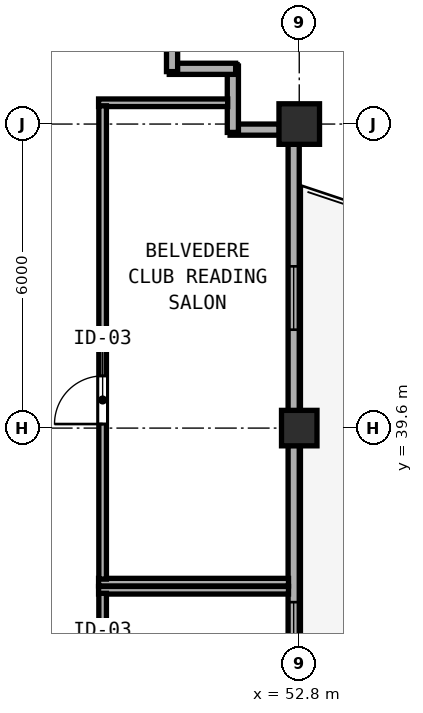
"""IFC4 building model, lengths in metres.
Left out: names, types, materials, properties, quantities, classifications, styles, units other than length and angle.
Written with IfcOpenShell. Run it as: python <this file> out.ifc"""

import sys

from ifc_helpers import new_model, si_unit, direction, frame, frame_2d, origin, origin_2d, place, context, subcontext, project, spatial, rectangle, hollow_rectangle, extrude, element, fill, save


model = new_model("IFC4")
c1 = context("Model", 3, precision=1e-05, world=origin(), true_north=direction((0.0, 1.0)))
c2 = subcontext(c1, "Body", "Model", "MODEL_VIEW")
j1 = project(units=[si_unit("LENGTHUNIT", "METRE"), si_unit("PLANEANGLEUNIT", "RADIAN")], contexts=[c1])
p1 = place(None, origin())
s1 = spatial("IfcSite", under=j1, at=p1, CompositionType="ELEMENT")
p2 = place(p1, origin())
s2 = spatial("IfcBuilding", under=s1, at=p2, CompositionType="ELEMENT")
p3 = place(p2, frame((0.0, 0.0, 235.2)))
s3 = spatial("IfcBuildingStorey", under=s2, at=p3, CompositionType="ELEMENT", Elevation=235.2)
p4 = place(p3, frame((52.8, 45.6, 0.0), z_axis=(0.0, 0.0, 1.0), x_axis=(1.0, 0.0, 0.0)))
e1 = element("IfcColumn", 1, at=p4, inside=s3, PredefinedType="COLUMN", context=c2, shape_type="SweptSolid", body=[
    extrude(hollow_rectangle(XDim=0.8, YDim=0.8, WallThickness=0.03, at=origin_2d()), origin(), (0.0, 0.0, 1.0), 3.85),
])
p5 = place(p3, frame((52.8, 39.6, 0.0), z_axis=(0.0, 0.0, 1.0), x_axis=(1.0, 0.0, 0.0)))
e2 = element("IfcColumn", 2, at=p5, inside=s3, PredefinedType="COLUMN", context=c2, shape_type="SweptSolid", body=[
    extrude(hollow_rectangle(XDim=0.7, YDim=0.7, WallThickness=0.026, at=origin_2d()), origin(), (0.0, 0.0, 1.0), 3.85),
])
p6 = place(p3, frame((52.69, 33.992, 0.0), z_axis=(0.0, 0.0, 1.0), x_axis=(0.0, 1.0, 0.0)))
e3 = element("IfcWall", 3, at=p6, inside=s3, PredefinedType="SOLIDWALL", context=c2, shape_type="SweptSolid", body=[
    extrude(rectangle(XDim=5.266, YDim=0.22, at=frame_2d((2.633, 0.0))), origin(), (0.0, 0.0, 1.0), 3.315),
])
p7 = place(p6, frame((0.923, 0.0, 0.85)))
e4 = element("IfcOpeningElement", 4, at=p7, cuts=e3, PredefinedType="OPENING", context=c2, shape_type="SweptSolid", body=[
    extrude(rectangle(XDim=1.25, YDim=1.95, at=frame_2d((0.625, 0.975))), frame((0.0, 0.12, 0.0), z_axis=(0.0, -1.0, 0.0), x_axis=(1.0, 0.0, 0.0)), (0.0, 0.0, 1.0), 0.24),
])
p8 = place(p3, frame((52.69, 39.942, 0.0), z_axis=(0.0, 0.0, 1.0), x_axis=(0.0, 1.0, 0.0)))
e5 = element("IfcWall", 5, at=p8, inside=s3, PredefinedType="SOLIDWALL", context=c2, shape_type="SweptSolid", body=[
    extrude(rectangle(XDim=5.266, YDim=0.22, at=frame_2d((2.633, 0.0))), origin(), (0.0, 0.0, 1.0), 3.315),
])
p9 = place(p8, frame((1.6, 0.0, 0.85)))
e6 = element("IfcOpeningElement", 6, at=p9, cuts=e5, PredefinedType="OPENING", context=c2, shape_type="SweptSolid", body=[
    extrude(rectangle(XDim=1.25, YDim=1.95, at=frame_2d((0.625, 0.975))), frame((0.0, 0.12, 0.0), z_axis=(0.0, -1.0, 0.0), x_axis=(1.0, 0.0, 0.0)), (0.0, 0.0, 1.0), 0.24),
])
p10 = place(p3, frame((52.408, 45.49, 0.0), z_axis=(0.0, 0.0, 1.0), x_axis=(-1.0, 0.0, 0.0)))
e7 = element("IfcWall", 7, at=p10, inside=s3, PredefinedType="SOLIDWALL", context=c2, shape_type="SweptSolid", body=[
    extrude(rectangle(XDim=0.973, YDim=0.22, at=frame_2d((0.486, 0.0))), origin(), (0.0, 0.0, 1.0), 3.67),
])
p11 = place(p3, frame((51.49, 45.435, 0.0), z_axis=(0.0, 0.0, 1.0), x_axis=(0.0, 1.0, 0.0)))
e8 = element("IfcWall", 8, at=p11, inside=s3, PredefinedType="SOLIDWALL", context=c2, shape_type="SweptSolid", body=[
    extrude(rectangle(XDim=1.31, YDim=0.22, at=frame_2d((0.655, 0.0))), origin(), (0.0, 0.0, 1.0), 3.67),
])
p12 = place(p3, frame((51.545, 46.69, 0.0), z_axis=(0.0, 0.0, 1.0), x_axis=(-1.0, 0.0, 0.0)))
e9 = element("IfcWall", 9, at=p12, inside=s3, PredefinedType="SOLIDWALL", context=c2, shape_type="SweptSolid", body=[
    extrude(rectangle(XDim=1.31, YDim=0.22, at=frame_2d((0.655, 0.0))), origin(), (0.0, 0.0, 1.0), 3.67),
])
p13 = place(p3, frame((50.29, 46.635, 0.0), z_axis=(0.0, 0.0, 1.0), x_axis=(0.0, 1.0, 0.0)))
e10 = element("IfcWall", 10, at=p13, inside=s3, PredefinedType="SOLIDWALL", context=c2, shape_type="SweptSolid", body=[
    extrude(rectangle(XDim=1.535, YDim=0.22, at=frame_2d((0.768, 0.0))), origin(), (0.0, 0.0, 1.0), 3.67),
])
p14 = place(p3, frame((48.84, 36.4, 0.0), z_axis=(0.0, 0.0, 1.0), x_axis=(1.0, 0.0, 0.0)))
e11 = element("IfcWall", 11, at=p14, inside=s3, PredefinedType="PARTITIONING", context=c2, shape_type="SweptSolid", body=[
    extrude(rectangle(XDim=3.748, YDim=0.15, at=frame_2d((1.874, 0.0))), origin(), (0.0, 0.0, 1.0), 3.67),
])
p15 = place(p3, frame((48.92, 33.06, 0.0), z_axis=(0.0, 0.0, 1.0), x_axis=(0.0, 1.0, 0.0)))
e12 = element("IfcWall", 12, at=p15, inside=s3, PredefinedType="PARTITIONING", context=c2, shape_type="SweptSolid", body=[
    extrude(rectangle(XDim=3.28, YDim=0.15, at=frame_2d((1.64, 0.0))), origin(), (0.0, 0.0, 1.0), 3.67),
])
p16 = place(p15, frame((0.86, 0.0, 0.0)))
e13 = element("IfcOpeningElement", 13, at=p16, cuts=e12, PredefinedType="OPENING", context=c2, shape_type="SweptSolid", body=[
    extrude(rectangle(XDim=0.95, YDim=2.12, at=frame_2d((0.475, 1.06))), frame((0.0, 0.085, 0.0), z_axis=(0.0, -1.0, 0.0), x_axis=(1.0, 0.0, 0.0)), (0.0, 0.0, 1.0), 0.17),
])
p17 = place(p3, frame((48.84, 46.02, 0.0), z_axis=(0.0, 0.0, 1.0), x_axis=(1.0, 0.0, 0.0)))
e14 = element("IfcWall", 14, at=p17, inside=s3, PredefinedType="PARTITIONING", context=c2, shape_type="SweptSolid", body=[
    extrude(rectangle(XDim=2.548, YDim=0.15, at=frame_2d((1.274, 0.0))), origin(), (0.0, 0.0, 1.0), 3.67),
])
p18 = place(p3, frame((48.84, 36.56, 0.0), z_axis=(0.0, 0.0, 1.0), x_axis=(1.0, 0.0, 0.0)))
e15 = element("IfcWall", 15, at=p18, inside=s3, PredefinedType="PARTITIONING", context=c2, shape_type="SweptSolid", body=[
    extrude(rectangle(XDim=3.748, YDim=0.15, at=frame_2d((1.874, 0.0))), origin(), (0.0, 0.0, 1.0), 3.67),
])
p19 = place(p3, frame((48.92, 36.62, 0.0), z_axis=(0.0, 0.0, 1.0), x_axis=(0.0, 1.0, 0.0)))
e16 = element("IfcWall", 16, at=p19, inside=s3, PredefinedType="PARTITIONING", context=c2, shape_type="SweptSolid", body=[
    extrude(rectangle(XDim=9.34, YDim=0.15, at=frame_2d((4.67, 0.0))), origin(), (0.0, 0.0, 1.0), 3.67),
])
p20 = place(p19, frame((3.06, 0.0, 0.0)))
e17 = element("IfcOpeningElement", 17, at=p20, cuts=e16, PredefinedType="OPENING", context=c2, shape_type="SweptSolid", body=[
    extrude(rectangle(XDim=0.95, YDim=2.12, at=frame_2d((0.475, 1.06))), frame((0.0, 0.085, 0.0), z_axis=(0.0, -1.0, 0.0), x_axis=(1.0, 0.0, 0.0)), (0.0, 0.0, 1.0), 0.17),
])
p21 = place(p7, origin())
e18 = element("IfcWindow", 18, at=p21, inside=s3, PartitioningType="SINGLE_PANEL", PredefinedType="WINDOW", context=c2, shape_type="SweptSolid", body=[
    extrude(rectangle(XDim=1.25, YDim=1.95, at=frame_2d((0.625, 0.975))), frame((0.0, 0.03, 0.0), z_axis=(0.0, -1.0, 0.0), x_axis=(1.0, 0.0, 0.0)), (0.0, 0.0, 1.0), 0.06),
])
fill(e4, e18)
p22 = place(p9, origin())
e19 = element("IfcWindow", 19, at=p22, inside=s3, PartitioningType="SINGLE_PANEL", PredefinedType="WINDOW", context=c2, shape_type="SweptSolid", body=[
    extrude(rectangle(XDim=1.25, YDim=1.95, at=frame_2d((0.625, 0.975))), frame((0.0, 0.03, 0.0), z_axis=(0.0, -1.0, 0.0), x_axis=(1.0, 0.0, 0.0)), (0.0, 0.0, 1.0), 0.06),
])
fill(e6, e19)
p23 = place(p20, origin())
e20 = element("IfcDoor", 20, at=p23, inside=s3, OperationType="SINGLE_SWING_LEFT", PredefinedType="DOOR", context=c2, shape_type="SweptSolid", body=[
    extrude(rectangle(XDim=0.95, YDim=2.12, at=frame_2d((0.475, 1.06))), frame((0.0, 0.025, 0.0), z_axis=(0.0, -1.0, 0.0), x_axis=(1.0, 0.0, 0.0)), (0.0, 0.0, 1.0), 0.05),
])
fill(e17, e20)
save(model, sys.argv[1])
